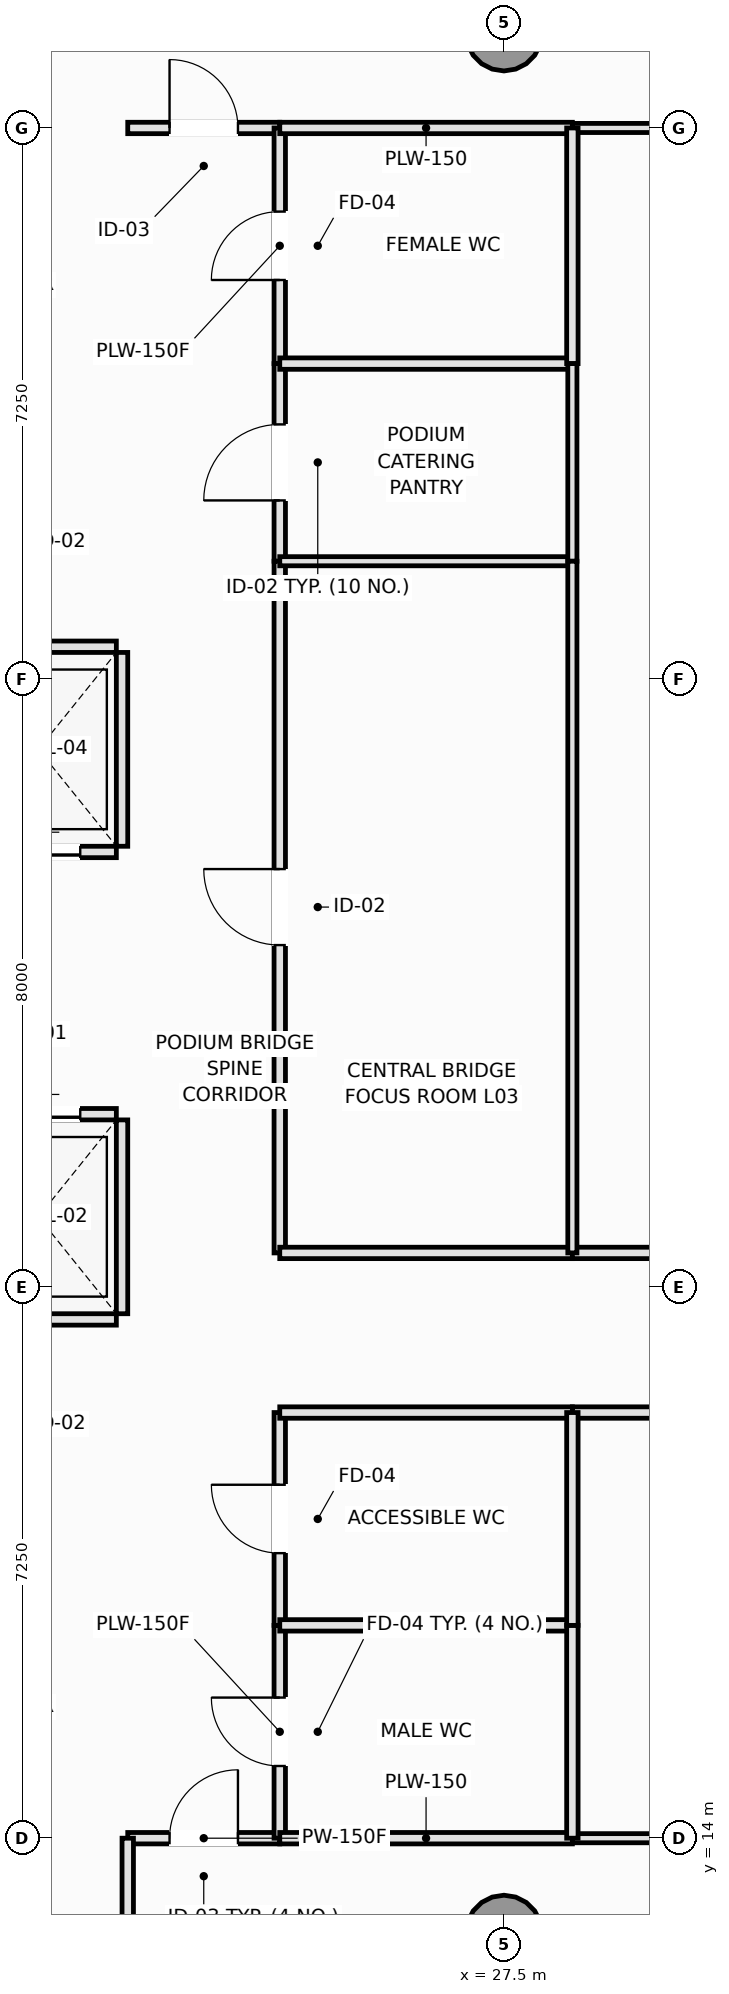
"""IFC4 building model, lengths in metres.
Left out: names, types, materials, properties, quantities, classifications, styles, units other than length and angle.
Written with IfcOpenShell. Run it as: python <this file> out.ifc"""

import sys

from ifc_helpers import new_model, si_unit, direction, frame, frame_2d, origin, origin_2d, place, context, subcontext, project, spatial, rectangle, circle, extrude, element, fill, save


model = new_model("IFC4")
c1 = context("Model", 3, precision=1e-05, world=origin(), true_north=direction((0.0, 1.0)))
c2 = subcontext(c1, "Body", "Model", "MODEL_VIEW")
j1 = project(units=[si_unit("LENGTHUNIT", "METRE"), si_unit("PLANEANGLEUNIT", "RADIAN")], contexts=[c1])
p1 = place(None, origin())
s1 = spatial("IfcSite", under=j1, at=p1, CompositionType="ELEMENT")
p2 = place(p1, origin())
s2 = spatial("IfcBuilding", under=s1, at=p2, CompositionType="ELEMENT")
p3 = place(p2, frame((0.0, 0.0, 15.6)))
s3 = spatial("IfcBuildingStorey", under=s2, at=p3, CompositionType="ELEMENT", Elevation=15.6)
for number, where, z_axis, x_axis in (
    (1, (27.5, 12.75, 0.0), (0.0, 0.0, 1.0), (1.0, 0.0, 0.0)),
    (2, (27.5, 37.75, 0.0), (0.0, 0.0, 1.0), (1.0, 0.0, 0.0)),
):
    element("IfcColumn", number, at=place(p3, frame(where, z_axis=z_axis, x_axis=x_axis)), inside=s3, PredefinedType="COLUMN", context=c2, shape_type="SweptSolid", body=[
        extrude(circle(Radius=0.5, at=origin_2d()), origin(), (0.0, 0.0, 1.0), 4.8),
    ])
p4 = place(p3, frame((20.35, 20.825, 0.0), z_axis=(0.0, 0.0, 1.0), x_axis=(1.0, 0.0, 0.0)))
e3 = element("IfcWall", 3, at=p4, inside=s3, PredefinedType="PARTITIONING", context=c2, shape_type="SweptSolid", body=[
    extrude(rectangle(XDim=2.05, YDim=0.15, at=frame_2d((1.025, 0.0))), origin(), (0.0, 0.0, 1.0), 4.6),
])
p5 = place(p3, frame((20.35, 23.525, 0.0), z_axis=(0.0, 0.0, 1.0), x_axis=(1.0, 0.0, 0.0)))
e4 = element("IfcWall", 4, at=p5, inside=s3, PredefinedType="PARTITIONING", context=c2, shape_type="SweptSolid", body=[
    extrude(rectangle(XDim=2.05, YDim=0.15, at=frame_2d((1.025, 0.0))), origin(), (0.0, 0.0, 1.0), 4.6),
])
p6 = place(p5, frame((0.475, 0.0, 0.0)))
e5 = element("IfcOpeningElement", 5, at=p6, cuts=e4, PredefinedType="OPENING", context=c2, shape_type="SweptSolid", body=[
    extrude(rectangle(XDim=1.1, YDim=2.2, at=frame_2d((0.55, 1.1))), frame((0.0, 0.085, 0.0), z_axis=(0.0, -1.0, 0.0), x_axis=(1.0, 0.0, 0.0)), (0.0, 0.0, 1.0), 0.17),
])
p7 = place(p3, frame((22.475, 20.9, 0.0), z_axis=(0.0, 0.0, 1.0), x_axis=(0.0, 1.0, 0.0)))
e6 = element("IfcWall", 6, at=p7, inside=s3, PredefinedType="PARTITIONING", context=c2, shape_type="SweptSolid", body=[
    extrude(rectangle(XDim=2.55, YDim=0.15, at=frame_2d((1.275, 0.0))), origin(), (0.0, 0.0, 1.0), 4.6),
])
p8 = place(p3, frame((20.35, 26.975, 0.0), z_axis=(0.0, 0.0, 1.0), x_axis=(1.0, 0.0, 0.0)))
e7 = element("IfcWall", 7, at=p8, inside=s3, PredefinedType="PARTITIONING", context=c2, shape_type="SweptSolid", body=[
    extrude(rectangle(XDim=2.05, YDim=0.15, at=frame_2d((1.025, 0.0))), origin(), (0.0, 0.0, 1.0), 4.6),
])
p9 = place(p8, frame((0.475, 0.0, 0.0)))
e8 = element("IfcOpeningElement", 8, at=p9, cuts=e7, PredefinedType="OPENING", context=c2, shape_type="SweptSolid", body=[
    extrude(rectangle(XDim=1.1, YDim=2.2, at=frame_2d((0.55, 1.1))), frame((0.0, 0.085, 0.0), z_axis=(0.0, -1.0, 0.0), x_axis=(1.0, 0.0, 0.0)), (0.0, 0.0, 1.0), 0.17),
])
p10 = place(p3, frame((20.35, 29.675, 0.0), z_axis=(0.0, 0.0, 1.0), x_axis=(1.0, 0.0, 0.0)))
e9 = element("IfcWall", 9, at=p10, inside=s3, PredefinedType="PARTITIONING", context=c2, shape_type="SweptSolid", body=[
    extrude(rectangle(XDim=2.05, YDim=0.15, at=frame_2d((1.025, 0.0))), origin(), (0.0, 0.0, 1.0), 4.6),
])
p11 = place(p3, frame((22.475, 27.05, 0.0), z_axis=(0.0, 0.0, 1.0), x_axis=(0.0, 1.0, 0.0)))
e10 = element("IfcWall", 10, at=p11, inside=s3, PredefinedType="PARTITIONING", context=c2, shape_type="SweptSolid", body=[
    extrude(rectangle(XDim=2.55, YDim=0.15, at=frame_2d((1.275, 0.0))), origin(), (0.0, 0.0, 1.0), 4.6),
])
p12 = place(p3, frame((22.55, 14.0, 0.0), z_axis=(0.0, 0.0, 1.0), x_axis=(1.0, 0.0, 0.0)))
e11 = element("IfcWall", 11, at=p12, inside=s3, PredefinedType="PARTITIONING", context=c2, shape_type="SweptSolid", body=[
    extrude(rectangle(XDim=2.0, YDim=0.15, at=frame_2d((1.0, 0.0))), origin(), (0.0, 0.0, 1.0), 4.6),
])
p13 = place(p12, frame((0.55, 0.0, 0.0)))
e12 = element("IfcOpeningElement", 12, at=p13, cuts=e11, PredefinedType="OPENING", context=c2, shape_type="SweptSolid", body=[
    extrude(rectangle(XDim=0.9, YDim=2.1, at=frame_2d((0.45, 1.05))), frame((0.0, 0.085, 0.0), z_axis=(0.0, -1.0, 0.0), x_axis=(1.0, 0.0, 0.0)), (0.0, 0.0, 1.0), 0.17),
])
p14 = place(p3, frame((22.55, 36.5, 0.0), z_axis=(0.0, 0.0, 1.0), x_axis=(1.0, 0.0, 0.0)))
e13 = element("IfcWall", 13, at=p14, inside=s3, PredefinedType="PARTITIONING", context=c2, shape_type="SweptSolid", body=[
    extrude(rectangle(XDim=2.0, YDim=0.15, at=frame_2d((1.0, 0.0))), origin(), (0.0, 0.0, 1.0), 4.6),
])
p15 = place(p14, frame((0.55, 0.0, 0.0)))
e14 = element("IfcOpeningElement", 14, at=p15, cuts=e13, PredefinedType="OPENING", context=c2, shape_type="SweptSolid", body=[
    extrude(rectangle(XDim=0.9, YDim=2.1, at=frame_2d((0.45, 1.05))), frame((0.0, 0.085, 0.0), z_axis=(0.0, -1.0, 0.0), x_axis=(1.0, 0.0, 0.0)), (0.0, 0.0, 1.0), 0.17),
])
p16 = place(p3, frame((24.55, 14.0, 0.0), z_axis=(0.0, 0.0, 1.0), x_axis=(0.0, 1.0, 0.0)))
e15 = element("IfcWall", 15, at=p16, inside=s3, PredefinedType="PLUMBINGWALL", context=c2, shape_type="SweptSolid", body=[
    extrude(rectangle(XDim=2.8, YDim=0.15, at=frame_2d((1.4, 0.0))), origin(), (0.0, 0.0, 1.0), 4.6),
])
p17 = place(p16, frame((0.95, 0.0, 0.0)))
e16 = element("IfcOpeningElement", 16, at=p17, cuts=e15, PredefinedType="OPENING", context=c2, shape_type="SweptSolid", body=[
    extrude(rectangle(XDim=0.9, YDim=2.1, at=frame_2d((0.45, 1.05))), frame((0.0, 0.085, 0.0), z_axis=(0.0, -1.0, 0.0), x_axis=(1.0, 0.0, 0.0)), (0.0, 0.0, 1.0), 0.17),
])
p18 = place(p3, frame((24.55, 33.4, 0.0), z_axis=(0.0, 0.0, 1.0), x_axis=(0.0, 1.0, 0.0)))
e17 = element("IfcWall", 17, at=p18, inside=s3, PredefinedType="PLUMBINGWALL", context=c2, shape_type="SweptSolid", body=[
    extrude(rectangle(XDim=3.1, YDim=0.15, at=frame_2d((1.55, 0.0))), origin(), (0.0, 0.0, 1.0), 4.6),
])
p19 = place(p18, frame((1.1, 0.0, 0.0)))
e18 = element("IfcOpeningElement", 18, at=p19, cuts=e17, PredefinedType="OPENING", context=c2, shape_type="SweptSolid", body=[
    extrude(rectangle(XDim=0.9, YDim=2.1, at=frame_2d((0.45, 1.05))), frame((0.0, 0.085, 0.0), z_axis=(0.0, -1.0, 0.0), x_axis=(1.0, 0.0, 0.0)), (0.0, 0.0, 1.0), 0.17),
])
p20 = place(p3, frame((24.55, 16.8, 0.0), z_axis=(0.0, 0.0, 1.0), x_axis=(0.0, 1.0, 0.0)))
e19 = element("IfcWall", 19, at=p20, inside=s3, PredefinedType="PLUMBINGWALL", context=c2, shape_type="SweptSolid", body=[
    extrude(rectangle(XDim=2.8, YDim=0.15, at=frame_2d((1.4, 0.0))), origin(), (0.0, 0.0, 1.0), 4.6),
])
p21 = place(p20, frame((0.95, 0.0, 0.0)))
e20 = element("IfcOpeningElement", 20, at=p21, cuts=e19, PredefinedType="OPENING", context=c2, shape_type="SweptSolid", body=[
    extrude(rectangle(XDim=0.9, YDim=2.1, at=frame_2d((0.45, 1.05))), frame((0.0, 0.085, 0.0), z_axis=(0.0, -1.0, 0.0), x_axis=(1.0, 0.0, 0.0)), (0.0, 0.0, 1.0), 0.17),
])
p22 = place(p3, frame((24.55, 30.8, 0.0), z_axis=(0.0, 0.0, 1.0), x_axis=(0.0, 1.0, 0.0)))
e21 = element("IfcWall", 21, at=p22, inside=s3, PredefinedType="PARTITIONING", context=c2, shape_type="SweptSolid", body=[
    extrude(rectangle(XDim=2.6, YDim=0.15, at=frame_2d((1.3, 0.0))), origin(), (0.0, 0.0, 1.0), 4.6),
])
p23 = place(p22, frame((0.8, 0.0, 0.0)))
e22 = element("IfcOpeningElement", 22, at=p23, cuts=e21, PredefinedType="OPENING", context=c2, shape_type="SweptSolid", body=[
    extrude(rectangle(XDim=1.0, YDim=2.15, at=frame_2d((0.5, 1.075))), frame((0.0, 0.085, 0.0), z_axis=(0.0, -1.0, 0.0), x_axis=(1.0, 0.0, 0.0)), (0.0, 0.0, 1.0), 0.17),
])
p24 = place(p3, frame((24.55, 21.7, 0.0), z_axis=(0.0, 0.0, 1.0), x_axis=(0.0, 1.0, 0.0)))
e23 = element("IfcWall", 23, at=p24, inside=s3, PredefinedType="PARTITIONING", context=c2, shape_type="SweptSolid", body=[
    extrude(rectangle(XDim=9.1, YDim=0.15, at=frame_2d((4.55, 0.0))), origin(), (0.0, 0.0, 1.0), 4.6),
])
p25 = place(p24, frame((4.05, 0.0, 0.0)))
e24 = element("IfcOpeningElement", 24, at=p25, cuts=e23, PredefinedType="OPENING", context=c2, shape_type="SweptSolid", body=[
    extrude(rectangle(XDim=1.0, YDim=2.15, at=frame_2d((0.5, 1.075))), frame((0.0, 0.085, 0.0), z_axis=(0.0, -1.0, 0.0), x_axis=(1.0, 0.0, 0.0)), (0.0, 0.0, 1.0), 0.17),
])
p26 = place(p3, frame((22.55, 11.75, 0.0), z_axis=(0.0, 0.0, 1.0), x_axis=(0.0, 1.0, 0.0)))
e25 = element("IfcWall", 25, at=p26, inside=s3, PredefinedType="PARTITIONING", context=c2, shape_type="SweptSolid", body=[
    extrude(rectangle(XDim=2.25, YDim=0.15, at=frame_2d((1.125, 0.0))), origin(), (0.0, 0.0, 1.0), 4.6),
])
p27 = place(p3, frame((24.55, 19.6, 0.0), z_axis=(0.0, 0.0, 1.0), x_axis=(1.0, 0.0, 0.0)))
e26 = element("IfcWall", 26, at=p27, inside=s3, PredefinedType="PLUMBINGWALL", context=c2, shape_type="SweptSolid", body=[
    extrude(rectangle(XDim=3.85, YDim=0.15, at=frame_2d((1.925, 0.0))), origin(), (0.0, 0.0, 1.0), 4.6),
])
p28 = place(p3, frame((28.4, 19.6, 0.0), z_axis=(0.0, 0.0, 1.0), x_axis=(1.0, 0.0, 0.0)))
e27 = element("IfcWall", 27, at=p28, inside=s3, PredefinedType="PARTITIONING", context=c2, shape_type="SweptSolid", body=[
    extrude(rectangle(XDim=20.35, YDim=0.15, at=frame_2d((10.175, 0.0))), origin(), (0.0, 0.0, 1.0), 4.6),
])
p29 = place(p28, frame((10.796, 0.0, 0.0)))
e28 = element("IfcOpeningElement", 28, at=p29, cuts=e27, PredefinedType="OPENING", context=c2, shape_type="SweptSolid", body=[
    extrude(rectangle(XDim=1.0, YDim=2.15, at=frame_2d((0.5, 1.075))), frame((0.0, 0.085, 0.0), z_axis=(0.0, -1.0, 0.0), x_axis=(1.0, 0.0, 0.0)), (0.0, 0.0, 1.0), 0.17),
])
p30 = place(p3, frame((24.55, 21.7, 0.0), z_axis=(0.0, 0.0, 1.0), x_axis=(1.0, 0.0, 0.0)))
e29 = element("IfcWall", 29, at=p30, inside=s3, PredefinedType="PARTITIONING", context=c2, shape_type="SweptSolid", body=[
    extrude(rectangle(XDim=3.85, YDim=0.15, at=frame_2d((1.925, 0.0))), origin(), (0.0, 0.0, 1.0), 4.6),
])
p31 = place(p3, frame((28.4, 21.7, 0.0), z_axis=(0.0, 0.0, 1.0), x_axis=(1.0, 0.0, 0.0)))
e30 = element("IfcWall", 30, at=p31, inside=s3, PredefinedType="PARTITIONING", context=c2, shape_type="SweptSolid", body=[
    extrude(rectangle(XDim=4.8, YDim=0.15, at=frame_2d((2.4, 0.0))), origin(), (0.0, 0.0, 1.0), 4.6),
])
p32 = place(p31, frame((1.9, 0.0, 0.0)))
e31 = element("IfcOpeningElement", 31, at=p32, cuts=e30, PredefinedType="OPENING", context=c2, shape_type="SweptSolid", body=[
    extrude(rectangle(XDim=1.0, YDim=2.15, at=frame_2d((0.5, 1.075))), frame((0.0, 0.085, 0.0), z_axis=(0.0, -1.0, 0.0), x_axis=(1.0, 0.0, 0.0)), (0.0, 0.0, 1.0), 0.17),
])
p33 = place(p3, frame((24.55, 14.0, 0.0), z_axis=(0.0, 0.0, 1.0), x_axis=(1.0, 0.0, 0.0)))
e32 = element("IfcWall", 32, at=p33, inside=s3, PredefinedType="PLUMBINGWALL", context=c2, shape_type="SweptSolid", body=[
    extrude(rectangle(XDim=3.85, YDim=0.15, at=frame_2d((1.925, 0.0))), origin(), (0.0, 0.0, 1.0), 4.6),
])
p34 = place(p3, frame((28.4, 14.0, 0.0), z_axis=(0.0, 0.0, 1.0), x_axis=(1.0, 0.0, 0.0)))
e33 = element("IfcWall", 33, at=p34, inside=s3, PredefinedType="PARTITIONING", context=c2, shape_type="SweptSolid", body=[
    extrude(rectangle(XDim=20.35, YDim=0.12, at=frame_2d((10.175, 0.0))), origin(), (0.0, 0.0, 1.0), 4.6),
])
p35 = place(p3, frame((24.55, 36.5, 0.0), z_axis=(0.0, 0.0, 1.0), x_axis=(1.0, 0.0, 0.0)))
e34 = element("IfcWall", 34, at=p35, inside=s3, PredefinedType="PLUMBINGWALL", context=c2, shape_type="SweptSolid", body=[
    extrude(rectangle(XDim=3.85, YDim=0.15, at=frame_2d((1.925, 0.0))), origin(), (0.0, 0.0, 1.0), 4.6),
])
p36 = place(p3, frame((28.4, 36.5, 0.0), z_axis=(0.0, 0.0, 1.0), x_axis=(1.0, 0.0, 0.0)))
e35 = element("IfcWall", 35, at=p36, inside=s3, PredefinedType="PARTITIONING", context=c2, shape_type="SweptSolid", body=[
    extrude(rectangle(XDim=4.8, YDim=0.12, at=frame_2d((2.4, 0.0))), origin(), (0.0, 0.0, 1.0), 4.6),
])
p37 = place(p3, frame((24.55, 16.8, 0.0), z_axis=(0.0, 0.0, 1.0), x_axis=(1.0, 0.0, 0.0)))
e36 = element("IfcWall", 36, at=p37, inside=s3, PredefinedType="PLUMBINGWALL", context=c2, shape_type="SweptSolid", body=[
    extrude(rectangle(XDim=3.85, YDim=0.15, at=frame_2d((1.925, 0.0))), origin(), (0.0, 0.0, 1.0), 4.6),
])
p38 = place(p3, frame((28.4, 14.0, 0.0), z_axis=(0.0, 0.0, 1.0), x_axis=(0.0, 1.0, 0.0)))
e37 = element("IfcWall", 37, at=p38, inside=s3, PredefinedType="PLUMBINGWALL", context=c2, shape_type="SweptSolid", body=[
    extrude(rectangle(XDim=2.8, YDim=0.15, at=frame_2d((1.4, 0.0))), origin(), (0.0, 0.0, 1.0), 4.6),
])
p39 = place(p3, frame((24.55, 33.4, 0.0), z_axis=(0.0, 0.0, 1.0), x_axis=(1.0, 0.0, 0.0)))
e38 = element("IfcWall", 38, at=p39, inside=s3, PredefinedType="PLUMBINGWALL", context=c2, shape_type="SweptSolid", body=[
    extrude(rectangle(XDim=3.85, YDim=0.15, at=frame_2d((1.925, 0.0))), origin(), (0.0, 0.0, 1.0), 4.6),
])
p40 = place(p3, frame((28.4, 33.4, 0.0), z_axis=(0.0, 0.0, 1.0), x_axis=(0.0, 1.0, 0.0)))
e39 = element("IfcWall", 39, at=p40, inside=s3, PredefinedType="PLUMBINGWALL", context=c2, shape_type="SweptSolid", body=[
    extrude(rectangle(XDim=3.1, YDim=0.15, at=frame_2d((1.55, 0.0))), origin(), (0.0, 0.0, 1.0), 4.6),
])
p41 = place(p3, frame((28.4, 16.8, 0.0), z_axis=(0.0, 0.0, 1.0), x_axis=(0.0, 1.0, 0.0)))
e40 = element("IfcWall", 40, at=p41, inside=s3, PredefinedType="PLUMBINGWALL", context=c2, shape_type="SweptSolid", body=[
    extrude(rectangle(XDim=2.8, YDim=0.15, at=frame_2d((1.4, 0.0))), origin(), (0.0, 0.0, 1.0), 4.6),
])
p42 = place(p3, frame((24.55, 30.8, 0.0), z_axis=(0.0, 0.0, 1.0), x_axis=(1.0, 0.0, 0.0)))
e41 = element("IfcWall", 41, at=p42, inside=s3, PredefinedType="PARTITIONING", context=c2, shape_type="SweptSolid", body=[
    extrude(rectangle(XDim=3.85, YDim=0.12, at=frame_2d((1.925, 0.0))), origin(), (0.0, 0.0, 1.0), 4.6),
])
p43 = place(p3, frame((28.4, 30.8, 0.0), z_axis=(0.0, 0.0, 1.0), x_axis=(0.0, 1.0, 0.0)))
e42 = element("IfcWall", 42, at=p43, inside=s3, PredefinedType="PARTITIONING", context=c2, shape_type="SweptSolid", body=[
    extrude(rectangle(XDim=2.6, YDim=0.12, at=frame_2d((1.3, 0.0))), origin(), (0.0, 0.0, 1.0), 4.6),
])
p44 = place(p3, frame((28.4, 21.7, 0.0), z_axis=(0.0, 0.0, 1.0), x_axis=(0.0, 1.0, 0.0)))
e43 = element("IfcWall", 43, at=p44, inside=s3, PredefinedType="PARTITIONING", context=c2, shape_type="SweptSolid", body=[
    extrude(rectangle(XDim=9.1, YDim=0.12, at=frame_2d((4.55, 0.0))), origin(), (0.0, 0.0, 1.0), 4.6),
])
p45 = place(p6, origin())
e44 = element("IfcDoor", 44, at=p45, inside=s3, OperationType="DOUBLE_DOOR_SLIDING", PredefinedType="DOOR", context=c2, shape_type="SweptSolid", body=[
    extrude(rectangle(XDim=1.1, YDim=2.2, at=frame_2d((0.55, 1.1))), frame((0.0, 0.025, 0.0), z_axis=(0.0, -1.0, 0.0), x_axis=(1.0, 0.0, 0.0)), (0.0, 0.0, 1.0), 0.05),
])
fill(e5, e44)
p46 = place(p9, origin())
e45 = element("IfcDoor", 45, at=p46, inside=s3, OperationType="DOUBLE_DOOR_SLIDING", PredefinedType="DOOR", context=c2, shape_type="SweptSolid", body=[
    extrude(rectangle(XDim=1.1, YDim=2.2, at=frame_2d((0.55, 1.1))), frame((0.0, 0.025, 0.0), z_axis=(0.0, -1.0, 0.0), x_axis=(1.0, 0.0, 0.0)), (0.0, 0.0, 1.0), 0.05),
])
fill(e8, e45)
p47 = place(p13, origin())
e46 = element("IfcDoor", 46, at=p47, inside=s3, OperationType="SINGLE_SWING_RIGHT", PredefinedType="DOOR", context=c2, shape_type="SweptSolid", body=[
    extrude(rectangle(XDim=0.9, YDim=2.1, at=frame_2d((0.45, 1.05))), frame((0.0, 0.025, 0.0), z_axis=(0.0, -1.0, 0.0), x_axis=(1.0, 0.0, 0.0)), (0.0, 0.0, 1.0), 0.05),
])
fill(e12, e46)
p48 = place(p15, origin())
e47 = element("IfcDoor", 47, at=p48, inside=s3, OperationType="SINGLE_SWING_LEFT", PredefinedType="DOOR", context=c2, shape_type="SweptSolid", body=[
    extrude(rectangle(XDim=0.9, YDim=2.1, at=frame_2d((0.45, 1.05))), frame((0.0, 0.025, 0.0), z_axis=(0.0, -1.0, 0.0), x_axis=(1.0, 0.0, 0.0)), (0.0, 0.0, 1.0), 0.05),
])
fill(e14, e47)
p49 = place(p17, origin())
e48 = element("IfcDoor", 48, at=p49, inside=s3, OperationType="SINGLE_SWING_RIGHT", PredefinedType="DOOR", context=c2, shape_type="SweptSolid", body=[
    extrude(rectangle(XDim=0.9, YDim=2.1, at=frame_2d((0.45, 1.05))), frame((0.0, 0.025, 0.0), z_axis=(0.0, -1.0, 0.0), x_axis=(1.0, 0.0, 0.0)), (0.0, 0.0, 1.0), 0.05),
])
fill(e16, e48)
p50 = place(p19, origin())
e49 = element("IfcDoor", 49, at=p50, inside=s3, OperationType="SINGLE_SWING_LEFT", PredefinedType="DOOR", context=c2, shape_type="SweptSolid", body=[
    extrude(rectangle(XDim=0.9, YDim=2.1, at=frame_2d((0.45, 1.05))), frame((0.0, 0.025, 0.0), z_axis=(0.0, -1.0, 0.0), x_axis=(1.0, 0.0, 0.0)), (0.0, 0.0, 1.0), 0.05),
])
fill(e18, e49)
p51 = place(p21, origin())
e50 = element("IfcDoor", 50, at=p51, inside=s3, OperationType="SINGLE_SWING_RIGHT", PredefinedType="DOOR", context=c2, shape_type="SweptSolid", body=[
    extrude(rectangle(XDim=0.9, YDim=2.1, at=frame_2d((0.45, 1.05))), frame((0.0, 0.025, 0.0), z_axis=(0.0, -1.0, 0.0), x_axis=(1.0, 0.0, 0.0)), (0.0, 0.0, 1.0), 0.05),
])
fill(e20, e50)
p52 = place(p23, origin())
e51 = element("IfcDoor", 51, at=p52, inside=s3, OperationType="SINGLE_SWING_LEFT", PredefinedType="DOOR", context=c2, shape_type="SweptSolid", body=[
    extrude(rectangle(XDim=1.0, YDim=2.15, at=frame_2d((0.5, 1.075))), frame((0.0, 0.025, 0.0), z_axis=(0.0, -1.0, 0.0), x_axis=(1.0, 0.0, 0.0)), (0.0, 0.0, 1.0), 0.05),
])
fill(e22, e51)
p53 = place(p25, origin())
e52 = element("IfcDoor", 52, at=p53, inside=s3, OperationType="SINGLE_SWING_RIGHT", PredefinedType="DOOR", context=c2, shape_type="SweptSolid", body=[
    extrude(rectangle(XDim=1.0, YDim=2.15, at=frame_2d((0.5, 1.075))), frame((0.0, 0.025, 0.0), z_axis=(0.0, -1.0, 0.0), x_axis=(1.0, 0.0, 0.0)), (0.0, 0.0, 1.0), 0.05),
])
fill(e24, e52)
save(model, sys.argv[1])
